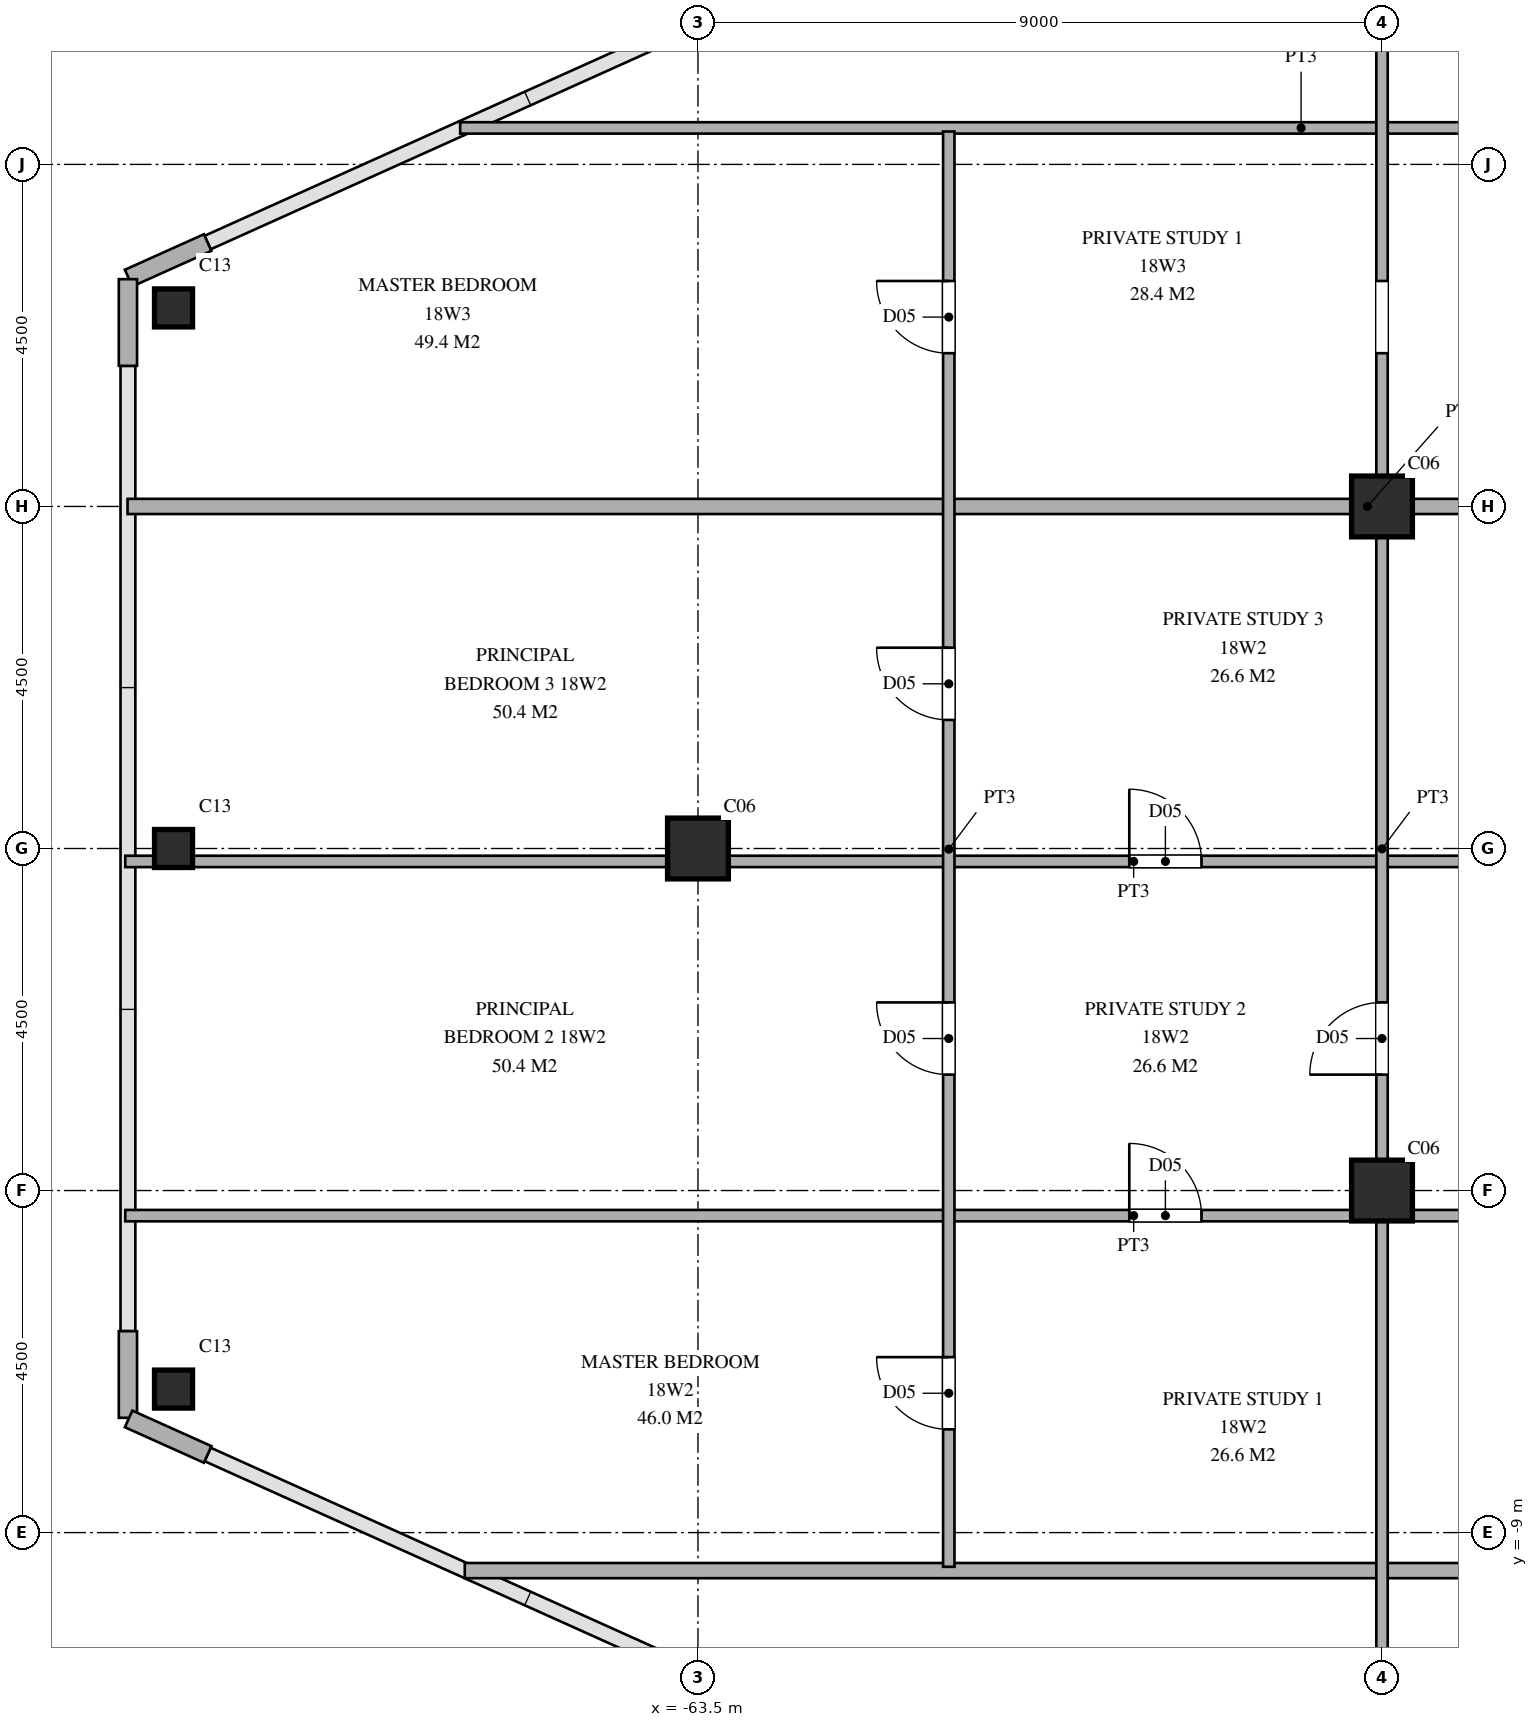
"""IFC4 building model, lengths in metres.
Left out: names, types, materials, properties, quantities, classifications, styles, units other than length and angle.
Written with IfcOpenShell. Run it as: python <this file> out.ifc"""

import sys

from ifc_helpers import new_model, si_unit, direction, frame, frame_2d, origin, origin_2d, place, context, subcontext, project, spatial, rectangle, hollow_rectangle, i_section, extrude, source, transform, mapped, element, fill, save


model = new_model("IFC4")
c1 = context("Model", 3, precision=1e-05, world=origin(), true_north=direction((0.0, 1.0)))
c2 = subcontext(c1, "Body", "Model", "MODEL_VIEW")
j1 = project(units=[si_unit("LENGTHUNIT", "METRE"), si_unit("PLANEANGLEUNIT", "RADIAN")], contexts=[c1])
p1 = place(None, origin())
s1 = spatial("IfcSite", under=j1, at=p1, CompositionType="ELEMENT")
p2 = place(p1, origin())
s2 = spatial("IfcBuilding", under=s1, at=p2, CompositionType="ELEMENT")
p3 = place(p2, frame((0.0, 0.0, 69.3)))
s3 = spatial("IfcBuildingStorey", under=s2, at=p3, CompositionType="ELEMENT", Elevation=69.3)
m1 = source(origin(), c2, "Body", "SweptSolid", [
    extrude(i_section(OverallWidth=0.8, OverallDepth=0.8, WebThickness=0.032, FlangeThickness=0.05, at=origin_2d()), origin(), (0.0, 0.0, 1.0), 3.6),
])
for number, where, z_axis, x_axis in (
    (1, (-54.5, -4.5, 0.0), (0.0, 0.0, 1.0), (1.0, 0.0, 0.0)),
    (2, (-54.5, 4.5, 0.0), (0.0, 0.0, 1.0), (1.0, 0.0, 0.0)),
    (3, (-63.5, 0.0, 0.0), (0.0, 0.0, 1.0), (1.0, 0.0, 0.0)),
):
    element("IfcColumn", number, at=place(p3, frame(where, z_axis=z_axis, x_axis=x_axis)), inside=s3, PredefinedType="COLUMN", context=c2, shape_type="MappedRepresentation", body=[
        mapped(m1, transform((0.0, 0.0, 0.0), scale=1.0)),
    ])
m2 = source(origin(), c2, "Body", "SweptSolid", [
    extrude(hollow_rectangle(XDim=0.5, YDim=0.5, WallThickness=0.02, at=origin_2d()), origin(), (0.0, 0.0, 1.0), 3.6),
])
for number, where, z_axis, x_axis in (
    (4, (-70.4, 7.112, 0.0), (0.0, 0.0, 1.0), (1.0, 0.0, 0.0)),
    (5, (-70.4, -7.112, 0.0), (0.0, 0.0, 1.0), (1.0, 0.0, 0.0)),
    (6, (-70.4, 0.0, 0.0), (0.0, 0.0, 1.0), (1.0, 0.0, 0.0)),
):
    element("IfcColumn", number, at=place(p3, frame(where, z_axis=z_axis, x_axis=x_axis)), inside=s3, PredefinedType="COLUMN", context=c2, shape_type="MappedRepresentation", body=[
        mapped(m2, transform((0.0, 0.0, 0.0), scale=1.0)),
    ])
for number, where, z_axis, x_axis in (
    (7, (-69.951, 7.972, 0.0), (0.0, 0.0, 1.0), (-0.912, -0.41, 0.0)),
    (8, (-71.0, 7.49, 0.0), (0.0, 0.0, 1.0), (0.0, -1.0, 0.0)),
    (9, (-71.0, -6.35, 0.0), (0.0, 0.0, 1.0), (0.0, -1.0, 0.0)),
    (10, (-70.991, -7.504, 0.0), (0.0, 0.0, 1.0), (0.912, -0.41, 0.0)),
):
    element("IfcWall", number, at=place(p3, frame(where, z_axis=z_axis, x_axis=x_axis)), inside=s3, PredefinedType="SOLIDWALL", context=c2, shape_type="SweptSolid", body=[
        extrude(rectangle(XDim=1.14, YDim=0.24, at=frame_2d((0.57, 0.0))), origin(), (0.0, 0.0, 1.0), 3.38),
    ])
p4 = place(p3, frame((-66.568, -9.5, 0.0), z_axis=(0.0, 0.0, 1.0), x_axis=(1.0, 0.0, 0.0)))
e11 = element("IfcWall", 11, at=p4, inside=s3, PredefinedType="PARTITIONING", context=c2, shape_type="SweptSolid", body=[
    extrude(rectangle(XDim=28.188, YDim=0.2, at=frame_2d((14.094, 0.0))), origin(), (0.0, 0.0, 1.0), 3.38),
])
p5 = place(p3, frame((-71.035, -4.83, 0.0), z_axis=(0.0, 0.0, 1.0), x_axis=(1.0, 0.0, 0.0)))
e12 = element("IfcWall", 12, at=p5, inside=s3, PredefinedType="PARTITIONING", context=c2, shape_type="SweptSolid", body=[
    extrude(rectangle(XDim=26.535, YDim=0.15, at=frame_2d((13.268, 0.0))), origin(), (0.0, 0.0, 1.0), 3.38),
])
p6 = place(p5, frame((21.085, 0.0, 0.0)))
e13 = element("IfcOpeningElement", 13, at=p6, cuts=e12, PredefinedType="OPENING", context=c2, shape_type="SweptSolid", body=[
    extrude(rectangle(XDim=0.95, YDim=2.15, at=frame_2d((0.475, 1.075))), frame((0.0, 0.085, 0.0), z_axis=(0.0, -1.0, 0.0), x_axis=(1.0, 0.0, 0.0)), (0.0, 0.0, 1.0), 0.17),
])
p7 = place(p5, frame((13.21, 0.0, 0.0)))
e14 = element("IfcOpeningElement", 14, at=p7, cuts=e12, PredefinedType="OPENING", context=c2, shape_type="SweptSolid", body=[
    extrude(rectangle(XDim=0.95, YDim=2.15, at=frame_2d((0.475, 1.075))), frame((0.0, 0.085, 0.0), z_axis=(0.0, -1.0, 0.0), x_axis=(1.0, 0.0, 0.0)), (0.0, 0.0, 1.0), 0.17),
])
p8 = place(p3, frame((-71.035, -0.17, 0.0), z_axis=(0.0, 0.0, 1.0), x_axis=(1.0, 0.0, 0.0)))
e15 = element("IfcWall", 15, at=p8, inside=s3, PredefinedType="PARTITIONING", context=c2, shape_type="SweptSolid", body=[
    extrude(rectangle(XDim=26.535, YDim=0.15, at=frame_2d((13.268, 0.0))), origin(), (0.0, 0.0, 1.0), 3.38),
])
p9 = place(p8, frame((21.085, 0.0, 0.0)))
e16 = element("IfcOpeningElement", 16, at=p9, cuts=e15, PredefinedType="OPENING", context=c2, shape_type="SweptSolid", body=[
    extrude(rectangle(XDim=0.95, YDim=2.15, at=frame_2d((0.475, 1.075))), frame((0.0, 0.085, 0.0), z_axis=(0.0, -1.0, 0.0), x_axis=(1.0, 0.0, 0.0)), (0.0, 0.0, 1.0), 0.17),
])
p10 = place(p8, frame((13.21, 0.0, 0.0)))
e17 = element("IfcOpeningElement", 17, at=p10, cuts=e15, PredefinedType="OPENING", context=c2, shape_type="SweptSolid", body=[
    extrude(rectangle(XDim=0.95, YDim=2.15, at=frame_2d((0.475, 1.075))), frame((0.0, 0.085, 0.0), z_axis=(0.0, -1.0, 0.0), x_axis=(1.0, 0.0, 0.0)), (0.0, 0.0, 1.0), 0.17),
])
p11 = place(p3, frame((-71.005, 4.5, 0.0), z_axis=(0.0, 0.0, 1.0), x_axis=(1.0, 0.0, 0.0)))
e18 = element("IfcWall", 18, at=p11, inside=s3, PredefinedType="PARTITIONING", context=c2, shape_type="SweptSolid", body=[
    extrude(rectangle(XDim=16.485, YDim=0.2, at=frame_2d((8.242, 0.0))), origin(), (0.0, 0.0, 1.0), 3.38),
])
p12 = place(p3, frame((-54.52, 4.5, 0.0), z_axis=(0.0, 0.0, 1.0), x_axis=(1.0, 0.0, 0.0)))
e19 = element("IfcWall", 19, at=p12, inside=s3, PredefinedType="PARTITIONING", context=c2, shape_type="SweptSolid", body=[
    extrude(rectangle(XDim=16.14, YDim=0.2, at=frame_2d((8.07, 0.0))), origin(), (0.0, 0.0, 1.0), 2.68),
])
p13 = place(p3, frame((-66.629, 9.48, 0.0), z_axis=(0.0, 0.0, 1.0), x_axis=(1.0, 0.0, 0.0)))
e20 = element("IfcWall", 20, at=p13, inside=s3, PredefinedType="PARTITIONING", context=c2, shape_type="SweptSolid", body=[
    extrude(rectangle(XDim=22.129, YDim=0.15, at=frame_2d((11.064, 0.0))), origin(), (0.0, 0.0, 1.0), 3.38),
])
p14 = place(p13, frame((16.679, 0.0, 0.0)))
e21 = element("IfcOpeningElement", 21, at=p14, cuts=e20, PredefinedType="OPENING", context=c2, shape_type="SweptSolid", body=[
    extrude(rectangle(XDim=0.95, YDim=2.15, at=frame_2d((0.475, 1.075))), frame((0.0, 0.085, 0.0), z_axis=(0.0, -1.0, 0.0), x_axis=(1.0, 0.0, 0.0)), (0.0, 0.0, 1.0), 0.17),
])
p15 = place(p3, frame((-60.2, -9.45, 0.0), z_axis=(0.0, 0.0, 1.0), x_axis=(0.0, 1.0, 0.0)))
e22 = element("IfcWall", 22, at=p15, inside=s3, PredefinedType="PARTITIONING", context=c2, shape_type="SweptSolid", body=[
    extrude(rectangle(XDim=18.883, YDim=0.15, at=frame_2d((9.441, 0.0))), origin(), (0.0, 0.0, 1.0), 3.38),
])
p16 = place(p15, frame((1.808, 0.0, 0.0)))
e23 = element("IfcOpeningElement", 23, at=p16, cuts=e22, PredefinedType="OPENING", context=c2, shape_type="SweptSolid", body=[
    extrude(rectangle(XDim=0.95, YDim=2.15, at=frame_2d((0.475, 1.075))), frame((0.0, 0.085, 0.0), z_axis=(0.0, -1.0, 0.0), x_axis=(1.0, 0.0, 0.0)), (0.0, 0.0, 1.0), 0.17),
])
p17 = place(p15, frame((6.475, 0.0, 0.0)))
e24 = element("IfcOpeningElement", 24, at=p17, cuts=e22, PredefinedType="OPENING", context=c2, shape_type="SweptSolid", body=[
    extrude(rectangle(XDim=0.95, YDim=2.15, at=frame_2d((0.475, 1.075))), frame((0.0, 0.085, 0.0), z_axis=(0.0, -1.0, 0.0), x_axis=(1.0, 0.0, 0.0)), (0.0, 0.0, 1.0), 0.17),
])
p18 = place(p15, frame((11.142, 0.0, 0.0)))
e25 = element("IfcOpeningElement", 25, at=p18, cuts=e22, PredefinedType="OPENING", context=c2, shape_type="SweptSolid", body=[
    extrude(rectangle(XDim=0.95, YDim=2.15, at=frame_2d((0.475, 1.075))), frame((0.0, 0.085, 0.0), z_axis=(0.0, -1.0, 0.0), x_axis=(1.0, 0.0, 0.0)), (0.0, 0.0, 1.0), 0.17),
])
p19 = place(p15, frame((15.966, 0.0, 0.0)))
e26 = element("IfcOpeningElement", 26, at=p19, cuts=e22, PredefinedType="OPENING", context=c2, shape_type="SweptSolid", body=[
    extrude(rectangle(XDim=0.95, YDim=2.15, at=frame_2d((0.475, 1.075))), frame((0.0, 0.085, 0.0), z_axis=(0.0, -1.0, 0.0), x_axis=(1.0, 0.0, 0.0)), (0.0, 0.0, 1.0), 0.17),
])
p20 = place(p3, frame((-54.5, -14.424, 0.0), z_axis=(0.0, 0.0, 1.0), x_axis=(0.0, 1.0, 0.0)))
e27 = element("IfcWall", 27, at=p20, inside=s3, PredefinedType="PARTITIONING", context=c2, shape_type="SweptSolid", body=[
    extrude(rectangle(XDim=28.839, YDim=0.15, at=frame_2d((14.419, 0.0))), origin(), (0.0, 0.0, 1.0), 2.68),
])
p21 = place(p20, frame((1.962, 0.0, 0.0)))
e28 = element("IfcOpeningElement", 28, at=p21, cuts=e27, PredefinedType="OPENING", context=c2, shape_type="SweptSolid", body=[
    extrude(rectangle(XDim=0.95, YDim=2.15, at=frame_2d((0.475, 1.075))), frame((0.0, 0.085, 0.0), z_axis=(0.0, -1.0, 0.0), x_axis=(1.0, 0.0, 0.0)), (0.0, 0.0, 1.0), 0.17),
])
p22 = place(p20, frame((11.449, 0.0, 0.0)))
e29 = element("IfcOpeningElement", 29, at=p22, cuts=e27, PredefinedType="OPENING", context=c2, shape_type="SweptSolid", body=[
    extrude(rectangle(XDim=0.95, YDim=2.15, at=frame_2d((0.475, 1.075))), frame((0.0, 0.085, 0.0), z_axis=(0.0, -1.0, 0.0), x_axis=(1.0, 0.0, 0.0)), (0.0, 0.0, 1.0), 0.17),
])
p23 = place(p20, frame((25.923, 0.0, 0.0)))
e30 = element("IfcOpeningElement", 30, at=p23, cuts=e27, PredefinedType="OPENING", context=c2, shape_type="SweptSolid", body=[
    extrude(rectangle(XDim=0.95, YDim=2.15, at=frame_2d((0.475, 1.075))), frame((0.0, 0.085, 0.0), z_axis=(0.0, -1.0, 0.0), x_axis=(1.0, 0.0, 0.0)), (0.0, 0.0, 1.0), 0.17),
])
p24 = place(p20, frame((20.94, 0.0, 0.0)))
e31 = element("IfcOpeningElement", 31, at=p24, cuts=e27, PredefinedType="OPENING", context=c2, shape_type="SweptSolid", body=[
    extrude(rectangle(XDim=0.95, YDim=2.15, at=frame_2d((0.475, 1.075))), frame((0.0, 0.085, 0.0), z_axis=(0.0, -1.0, 0.0), x_axis=(1.0, 0.0, 0.0)), (0.0, 0.0, 1.0), 0.17),
])
m3 = source(origin(), c2, "Body", "SweptSolid", [
    extrude(rectangle(XDim=0.95, YDim=2.15, at=frame_2d((0.475, 1.075))), frame((0.0, 0.025, 0.0), z_axis=(0.0, -1.0, 0.0), x_axis=(1.0, 0.0, 0.0)), (0.0, 0.0, 1.0), 0.05),
])
p25 = place(p7, origin())
e32 = element("IfcDoor", 32, at=p25, inside=s3, OperationType="SINGLE_SWING_LEFT", PredefinedType="DOOR", context=c2, shape_type="MappedRepresentation", body=[
    mapped(m3, transform((0.0, 0.0, 0.0), scale=1.0)),
])
fill(e14, e32)
p26 = place(p10, origin())
e33 = element("IfcDoor", 33, at=p26, inside=s3, OperationType="SINGLE_SWING_LEFT", PredefinedType="DOOR", context=c2, shape_type="MappedRepresentation", body=[
    mapped(m3, transform((0.0, 0.0, 0.0), scale=1.0)),
])
fill(e17, e33)
p27 = place(p16, origin())
e34 = element("IfcDoor", 34, at=p27, inside=s3, OperationType="SINGLE_SWING_RIGHT", PredefinedType="DOOR", context=c2, shape_type="MappedRepresentation", body=[
    mapped(m3, transform((0.0, 0.0, 0.0), scale=1.0)),
])
fill(e23, e34)
p28 = place(p17, origin())
e35 = element("IfcDoor", 35, at=p28, inside=s3, OperationType="SINGLE_SWING_RIGHT", PredefinedType="DOOR", context=c2, shape_type="MappedRepresentation", body=[
    mapped(m3, transform((0.0, 0.0, 0.0), scale=1.0)),
])
fill(e24, e35)
p29 = place(p18, origin())
e36 = element("IfcDoor", 36, at=p29, inside=s3, OperationType="SINGLE_SWING_RIGHT", PredefinedType="DOOR", context=c2, shape_type="MappedRepresentation", body=[
    mapped(m3, transform((0.0, 0.0, 0.0), scale=1.0)),
])
fill(e25, e36)
p30 = place(p19, origin())
e37 = element("IfcDoor", 37, at=p30, inside=s3, OperationType="SINGLE_SWING_RIGHT", PredefinedType="DOOR", context=c2, shape_type="MappedRepresentation", body=[
    mapped(m3, transform((0.0, 0.0, 0.0), scale=1.0)),
])
fill(e26, e37)
p31 = place(p22, origin())
e38 = element("IfcDoor", 38, at=p31, inside=s3, OperationType="SINGLE_SWING_LEFT", PredefinedType="DOOR", context=c2, shape_type="MappedRepresentation", body=[
    mapped(m3, transform((0.0, 0.0, 0.0), scale=1.0)),
])
fill(e29, e38)
save(model, sys.argv[1])
